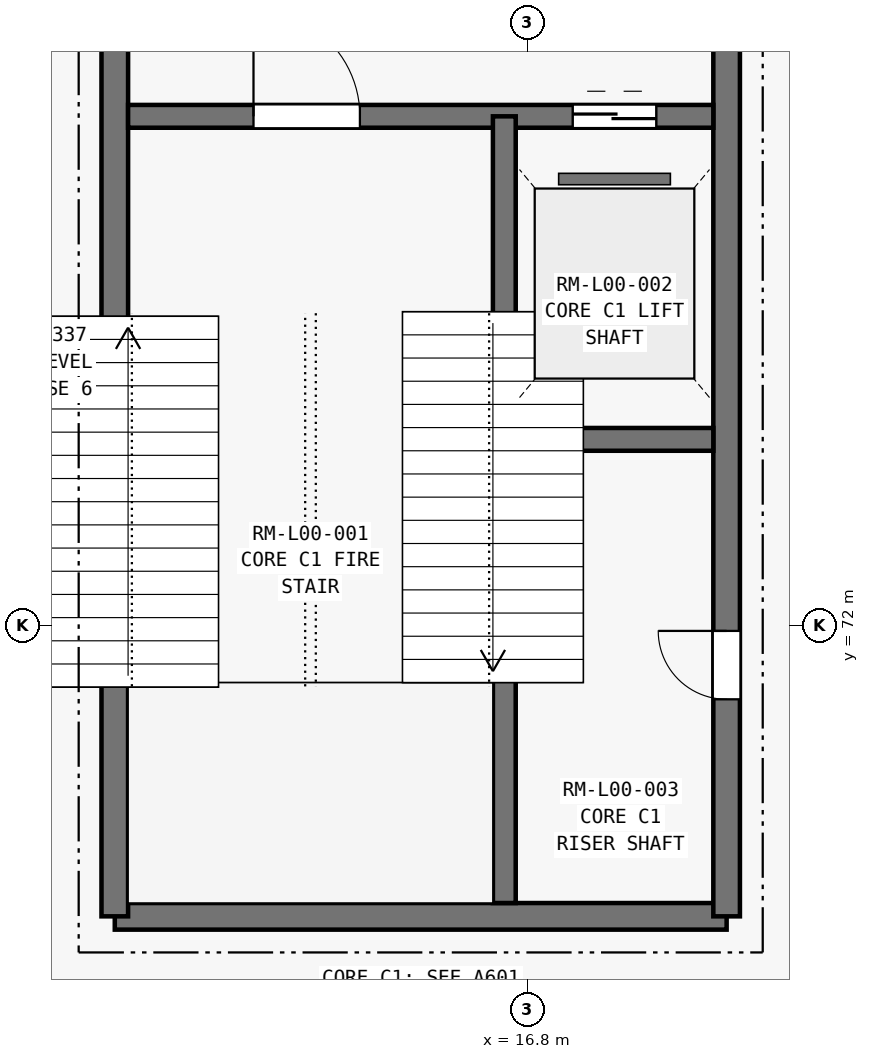
"""IFC4 building model, lengths in metres.
Left out: names, types, materials, properties, quantities, classifications, styles, units other than length and angle.
Written with IfcOpenShell. Run it as: python <this file> out.ifc"""

import sys

from ifc_helpers import new_model, si_unit, direction, frame, frame_2d, origin, place, context, subcontext, project, spatial, rectangle, extrude, element, fill, save


model = new_model("IFC4")
c1 = context("Model", 3, precision=1e-05, world=origin(), true_north=direction((0.0, 1.0)))
c2 = subcontext(c1, "Body", "Model", "MODEL_VIEW")
j1 = project(units=[si_unit("LENGTHUNIT", "METRE"), si_unit("PLANEANGLEUNIT", "RADIAN")], contexts=[c1])
p1 = place(None, origin())
s1 = spatial("IfcSite", under=j1, at=p1, CompositionType="ELEMENT")
p2 = place(p1, origin())
s2 = spatial("IfcBuilding", under=s1, at=p2, CompositionType="ELEMENT")
p3 = place(p2, origin())
s3 = spatial("IfcBuildingStorey", under=s2, at=p3, CompositionType="ELEMENT", Elevation=0.0)
p4 = place(p3, frame((11.375, 68.175, 0.0), z_axis=(0.0, 0.0, 1.0), x_axis=(1.0, 0.0, 0.0)))
e1 = element("IfcWall", 1, at=p4, inside=s3, PredefinedType="SHEAR", context=c2, shape_type="SweptSolid", body=[
    extrude(rectangle(XDim=8.05, YDim=0.35, at=frame_2d((4.025, 0.0))), origin(), (0.0, 0.0, 1.0), 5.4),
])
p5 = place(p3, frame((11.375, 68.175, 0.0), z_axis=(0.0, 0.0, 1.0), x_axis=(0.0, 1.0, 0.0)))
e2 = element("IfcWall", 2, at=p5, inside=s3, PredefinedType="SHEAR", context=c2, shape_type="SweptSolid", body=[
    extrude(rectangle(XDim=14.85, YDim=0.35, at=frame_2d((7.425, 0.0))), origin(), (0.0, 0.0, 1.0), 5.4),
])
p6 = place(p3, frame((19.425, 68.175, 0.0), z_axis=(0.0, 0.0, 1.0), x_axis=(0.0, 1.0, 0.0)))
e3 = element("IfcWall", 3, at=p6, inside=s3, PredefinedType="SHEAR", context=c2, shape_type="SweptSolid", body=[
    extrude(rectangle(XDim=14.85, YDim=0.35, at=frame_2d((7.425, 0.0))), origin(), (0.0, 0.0, 1.0), 5.4),
])
p7 = place(p6, frame((2.855, 0.0, 0.0)))
e4 = element("IfcOpeningElement", 4, at=p7, cuts=e3, PredefinedType="OPENING", context=c2, shape_type="SweptSolid", body=[
    extrude(rectangle(XDim=0.9, YDim=2.1, at=frame_2d((0.45, 1.05))), frame((0.0, 0.185, 0.0), z_axis=(0.0, -1.0, 0.0), x_axis=(1.0, 0.0, 0.0)), (0.0, 0.0, 1.0), 0.37),
])
p8 = place(p3, frame((11.55, 78.7, 0.0), z_axis=(0.0, 0.0, 1.0), x_axis=(1.0, 0.0, 0.0)))
e5 = element("IfcWall", 5, at=p8, inside=s3, PredefinedType="SHEAR", context=c2, shape_type="SweptSolid", body=[
    extrude(rectangle(XDim=7.7, YDim=0.3, at=frame_2d((3.85, 0.0))), origin(), (0.0, 0.0, 1.0), 5.4),
])
p9 = place(p8, frame((1.65, 0.0, 0.0)))
e6 = element("IfcOpeningElement", 6, at=p9, cuts=e5, PredefinedType="OPENING", context=c2, shape_type="SweptSolid", body=[
    extrude(rectangle(XDim=1.4, YDim=2.2, at=frame_2d((0.7, 1.1))), frame((0.0, 0.16, 0.0), z_axis=(0.0, -1.0, 0.0), x_axis=(1.0, 0.0, 0.0)), (0.0, 0.0, 1.0), 0.32),
])
p10 = place(p8, frame((5.85, 0.0, 0.0)))
e7 = element("IfcOpeningElement", 7, at=p10, cuts=e5, PredefinedType="OPENING", context=c2, shape_type="SweptSolid", body=[
    extrude(rectangle(XDim=1.1, YDim=2.2, at=frame_2d((0.55, 1.1))), frame((0.0, 0.16, 0.0), z_axis=(0.0, -1.0, 0.0), x_axis=(1.0, 0.0, 0.0)), (0.0, 0.0, 1.0), 0.32),
])
p11 = place(p3, frame((16.5, 68.35, 0.0), z_axis=(0.0, 0.0, 1.0), x_axis=(0.0, 1.0, 0.0)))
e8 = element("IfcWall", 8, at=p11, inside=s3, PredefinedType="SHEAR", context=c2, shape_type="SweptSolid", body=[
    extrude(rectangle(XDim=10.35, YDim=0.3, at=frame_2d((5.175, 0.0))), origin(), (0.0, 0.0, 1.0), 5.4),
])
p12 = place(p3, frame((16.65, 74.45, 0.0), z_axis=(0.0, 0.0, 1.0), x_axis=(1.0, 0.0, 0.0)))
e9 = element("IfcWall", 9, at=p12, inside=s3, PredefinedType="SHEAR", context=c2, shape_type="SweptSolid", body=[
    extrude(rectangle(XDim=2.6, YDim=0.3, at=frame_2d((1.3, 0.0))), origin(), (0.0, 0.0, 1.0), 5.4),
])
p13 = place(p9, origin())
e10 = element("IfcDoor", 10, at=p13, inside=s3, OperationType="SINGLE_SWING_LEFT", PredefinedType="DOOR", context=c2, shape_type="SweptSolid", body=[
    extrude(rectangle(XDim=1.4, YDim=2.2, at=frame_2d((0.7, 1.1))), frame((0.0, 0.025, 0.0), z_axis=(0.0, -1.0, 0.0), x_axis=(1.0, 0.0, 0.0)), (0.0, 0.0, 1.0), 0.05),
])
fill(e6, e10)
p14 = place(p7, origin())
e11 = element("IfcDoor", 11, at=p14, inside=s3, OperationType="SINGLE_SWING_RIGHT", PredefinedType="DOOR", context=c2, shape_type="SweptSolid", body=[
    extrude(rectangle(XDim=0.9, YDim=2.1, at=frame_2d((0.45, 1.05))), frame((0.0, 0.025, 0.0), z_axis=(0.0, -1.0, 0.0), x_axis=(1.0, 0.0, 0.0)), (0.0, 0.0, 1.0), 0.05),
])
fill(e4, e11)
p15 = place(p10, origin())
e12 = element("IfcDoor", 12, at=p15, inside=s3, OperationType="SLIDING_TO_LEFT", PredefinedType="DOOR", context=c2, shape_type="SweptSolid", body=[
    extrude(rectangle(XDim=1.1, YDim=2.2, at=frame_2d((0.55, 1.1))), frame((0.0, 0.025, 0.0), z_axis=(0.0, -1.0, 0.0), x_axis=(1.0, 0.0, 0.0)), (0.0, 0.0, 1.0), 0.05),
])
fill(e7, e12)
save(model, sys.argv[1])
